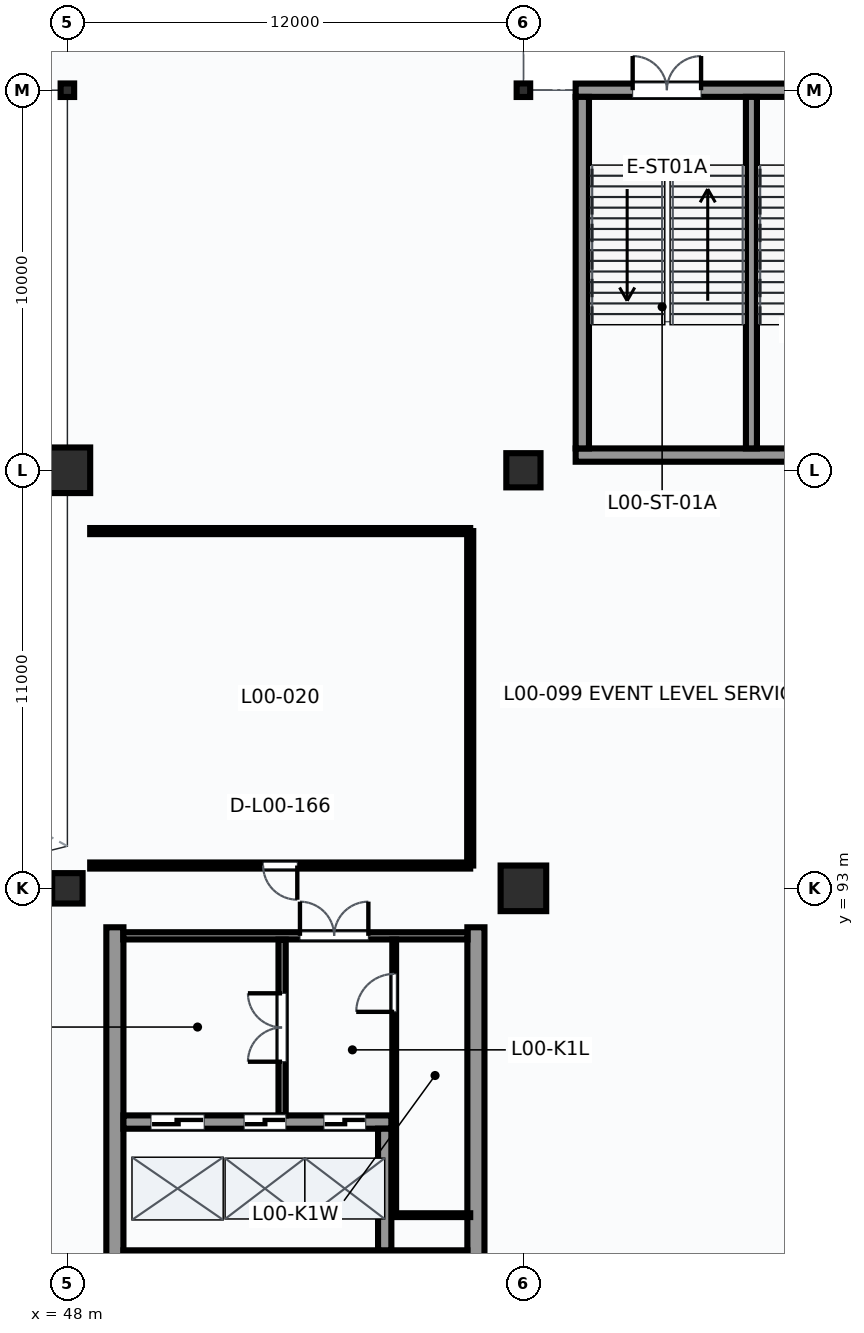
"""IFC4 building model, lengths in metres.
Left out: names, types, materials, properties, quantities, classifications, styles, units other than length and angle.
Written with IfcOpenShell. Run it as: python <this file> out.ifc"""

import sys

from ifc_helpers import new_model, si_unit, direction, frame, frame_2d, origin, origin_2d, place, context, subcontext, project, spatial, rectangle, circle, hollow_circle, extrude, element, fill, save


model = new_model("IFC4")
c1 = context("Model", 3, precision=1e-05, world=origin(), true_north=direction((0.0, 1.0)))
c2 = subcontext(c1, "Body", "Model", "MODEL_VIEW")
j1 = project(units=[si_unit("LENGTHUNIT", "METRE"), si_unit("PLANEANGLEUNIT", "RADIAN")], contexts=[c1])
p1 = place(None, origin())
s1 = spatial("IfcSite", under=j1, at=p1, CompositionType="ELEMENT")
p2 = place(p1, origin())
s2 = spatial("IfcBuilding", under=s1, at=p2, CompositionType="ELEMENT")
p3 = place(p2, origin())
s3 = spatial("IfcBuildingStorey", under=s2, at=p3, CompositionType="ELEMENT", Elevation=0.0)
p4 = place(p3, frame((48.0, 93.0, 0.0), z_axis=(0.0, 0.0, 1.0), x_axis=(1.0, 0.0, 0.0)))
e1 = element("IfcColumn", 1, at=p4, inside=s3, PredefinedType="COLUMN", context=c2, shape_type="SweptSolid", body=[
    extrude(rectangle(XDim=0.8, YDim=0.8, at=origin_2d()), origin(), (0.0, 0.0, 1.0), 5.4),
])
p5 = place(p3, frame((48.0, 104.0, 0.0), z_axis=(0.0, 0.0, 1.0), x_axis=(1.0, 0.0, 0.0)))
e2 = element("IfcColumn", 2, at=p5, inside=s3, PredefinedType="COLUMN", context=c2, shape_type="SweptSolid", body=[
    extrude(rectangle(XDim=1.2, YDim=1.2, at=origin_2d()), origin(), (0.0, 0.0, 1.0), 5.4),
])
p6 = place(p3, frame((48.0, 114.0, 0.0), z_axis=(0.0, 0.0, 1.0), x_axis=(1.0, 0.0, 0.0)))
e3 = element("IfcColumn", 3, at=p6, inside=s3, PredefinedType="PILASTER", context=c2, shape_type="SweptSolid", body=[
    extrude(hollow_circle(Radius=0.178, WallThickness=0.014, at=origin_2d()), origin(), (0.0, 0.0, 1.0), 5.4),
])
p7 = place(p3, frame((60.0, 93.0, 0.0), z_axis=(0.0, 0.0, 1.0), x_axis=(1.0, 0.0, 0.0)))
e4 = element("IfcColumn", 4, at=p7, inside=s3, PredefinedType="COLUMN", context=c2, shape_type="SweptSolid", body=[
    extrude(rectangle(XDim=1.2, YDim=1.2, at=origin_2d()), origin(), (0.0, 0.0, 1.0), 5.4),
])
p8 = place(p3, frame((60.0, 104.0, 0.0), z_axis=(0.0, 0.0, 1.0), x_axis=(1.0, 0.0, 0.0)))
e5 = element("IfcColumn", 5, at=p8, inside=s3, PredefinedType="COLUMN", context=c2, shape_type="SweptSolid", body=[
    extrude(circle(Radius=0.45, at=origin_2d()), origin(), (0.0, 0.0, 1.0), 5.4),
])
p9 = place(p3, frame((60.0, 114.0, 0.0), z_axis=(0.0, 0.0, 1.0), x_axis=(1.0, 0.0, 0.0)))
e6 = element("IfcColumn", 6, at=p9, inside=s3, PredefinedType="PILASTER", context=c2, shape_type="SweptSolid", body=[
    extrude(hollow_circle(Radius=0.178, WallThickness=0.014, at=origin_2d()), origin(), (0.0, 0.0, 1.0), 5.4),
])
p10 = place(p3, frame((61.375, 104.4, 0.0), z_axis=(0.0, 0.0, 1.0), x_axis=(1.0, 0.0, 0.0)))
e7 = element("IfcWall", 7, at=p10, inside=s3, PredefinedType="SHEAR", context=c2, shape_type="SweptSolid", body=[
    extrude(rectangle(XDim=9.25, YDim=0.35, at=frame_2d((4.625, 0.0))), origin(), (0.0, 0.0, 1.0), 5.4),
])
p11 = place(p3, frame((61.375, 114.0, 0.0), z_axis=(0.0, 0.0, 1.0), x_axis=(1.0, 0.0, 0.0)))
e8 = element("IfcWall", 8, at=p11, inside=s3, PredefinedType="SHEAR", context=c2, shape_type="SweptSolid", body=[
    extrude(rectangle(XDim=9.25, YDim=0.35, at=frame_2d((4.625, 0.0))), origin(), (0.0, 0.0, 1.0), 4.496),
])
p12 = place(p11, frame((1.5, 0.0, 0.0)))
e9 = element("IfcOpeningElement", 9, at=p12, cuts=e8, PredefinedType="OPENING", context=c2, shape_type="SweptSolid", body=[
    extrude(rectangle(XDim=1.8, YDim=2.2, at=frame_2d((0.9, 1.1))), frame((0.0, 0.185, 0.0), z_axis=(0.0, -1.0, 0.0), x_axis=(1.0, 0.0, 0.0)), (0.0, 0.0, 1.0), 0.37),
])
p13 = place(p11, frame((6.05, 0.0, 0.0)))
e10 = element("IfcOpeningElement", 10, at=p13, cuts=e8, PredefinedType="OPENING", context=c2, shape_type="SweptSolid", body=[
    extrude(rectangle(XDim=1.6, YDim=2.2, at=frame_2d((0.8, 1.1))), frame((0.0, 0.185, 0.0), z_axis=(0.0, -1.0, 0.0), x_axis=(1.0, 0.0, 0.0)), (0.0, 0.0, 1.0), 0.37),
])
p14 = place(p3, frame((61.55, 104.575, 0.0), z_axis=(0.0, 0.0, 1.0), x_axis=(0.0, 1.0, 0.0)))
e11 = element("IfcWall", 11, at=p14, inside=s3, PredefinedType="SHEAR", context=c2, shape_type="SweptSolid", body=[
    extrude(rectangle(XDim=9.25, YDim=0.35, at=frame_2d((4.625, 0.0))), origin(), (0.0, 0.0, 1.0), 5.4),
])
p15 = place(p3, frame((66.0, 104.575, 0.0), z_axis=(0.0, 0.0, 1.0), x_axis=(0.0, 1.0, 0.0)))
e12 = element("IfcWall", 12, at=p15, inside=s3, PredefinedType="SHEAR", context=c2, shape_type="SweptSolid", body=[
    extrude(rectangle(XDim=9.25, YDim=0.29, at=frame_2d((4.625, 0.0))), origin(), (0.0, 0.0, 1.0), 5.4),
])
for number, where, z_axis, x_axis in (
    (13, (49.25, 83.025, 0.0), (0.0, 0.0, 1.0), (0.0, 1.0, 0.0)),
    (14, (58.75, 83.025, 0.0), (0.0, 0.0, 1.0), (0.0, 1.0, 0.0)),
):
    element("IfcWall", number, at=place(p3, frame(where, z_axis=z_axis, x_axis=x_axis)), inside=s3, PredefinedType="SHEAR", context=c2, shape_type="SweptSolid", body=[
        extrude(rectangle(XDim=8.95, YDim=0.45, at=frame_2d((4.475, 0.0))), origin(), (0.0, 0.0, 1.0), 5.4),
    ])
p16 = place(p3, frame((49.475, 83.25, 0.0), z_axis=(0.0, 0.0, 1.0), x_axis=(1.0, 0.0, 0.0)))
e15 = element("IfcWall", 15, at=p16, inside=s3, PredefinedType="SHEAR", context=c2, shape_type="SweptSolid", body=[
    extrude(rectangle(XDim=9.05, YDim=0.45, at=frame_2d((4.525, 0.0))), origin(), (0.0, 0.0, 1.0), 5.4),
])
p17 = place(p3, frame((49.475, 86.85, 0.0), z_axis=(0.0, 0.0, 1.0), x_axis=(1.0, 0.0, 0.0)))
e16 = element("IfcWall", 16, at=p17, inside=s3, PredefinedType="SHEAR", context=c2, shape_type="SweptSolid", body=[
    extrude(rectangle(XDim=7.05, YDim=0.35, at=frame_2d((3.525, 0.0))), origin(), (0.0, 0.0, 1.0), 5.4),
])
p18 = place(p17, frame((0.725, 0.0, 0.0)))
e17 = element("IfcOpeningElement", 17, at=p18, cuts=e16, PredefinedType="OPENING", context=c2, shape_type="SweptSolid", body=[
    extrude(rectangle(XDim=1.4, YDim=2.3, at=frame_2d((0.7, 1.15))), frame((0.0, 0.185, 0.0), z_axis=(0.0, -1.0, 0.0), x_axis=(1.0, 0.0, 0.0)), (0.0, 0.0, 1.0), 0.37),
])
p19 = place(p17, frame((3.175, 0.0, 0.0)))
e18 = element("IfcOpeningElement", 18, at=p19, cuts=e16, PredefinedType="OPENING", context=c2, shape_type="SweptSolid", body=[
    extrude(rectangle(XDim=1.1, YDim=2.2, at=frame_2d((0.55, 1.1))), frame((0.0, 0.185, 0.0), z_axis=(0.0, -1.0, 0.0), x_axis=(1.0, 0.0, 0.0)), (0.0, 0.0, 1.0), 0.37),
])
p20 = place(p17, frame((5.275, 0.0, 0.0)))
e19 = element("IfcOpeningElement", 19, at=p20, cuts=e16, PredefinedType="OPENING", context=c2, shape_type="SweptSolid", body=[
    extrude(rectangle(XDim=1.1, YDim=2.2, at=frame_2d((0.55, 1.1))), frame((0.0, 0.185, 0.0), z_axis=(0.0, -1.0, 0.0), x_axis=(1.0, 0.0, 0.0)), (0.0, 0.0, 1.0), 0.37),
])
p21 = place(p3, frame((56.35, 83.475, 0.0), z_axis=(0.0, 0.0, 1.0), x_axis=(0.0, 1.0, 0.0)))
e20 = element("IfcWall", 20, at=p21, inside=s3, PredefinedType="SHEAR", context=c2, shape_type="SweptSolid", body=[
    extrude(rectangle(XDim=3.2, YDim=0.35, at=frame_2d((1.6, 0.0))), origin(), (0.0, 0.0, 1.0), 5.4),
])
p22 = place(p3, frame((49.47, 91.75, 0.0), z_axis=(0.0, 0.0, 1.0), x_axis=(1.0, 0.0, 0.0)))
e21 = element("IfcWall", 21, at=p22, inside=s3, PredefinedType="PARTITIONING", context=c2, shape_type="SweptSolid", body=[
    extrude(rectangle(XDim=9.06, YDim=0.19, at=frame_2d((4.53, 0.0))), origin(), (0.0, 0.0, 1.0), 5.06),
])
p23 = place(p22, frame((4.65, 0.0, 0.0)))
e22 = element("IfcOpeningElement", 22, at=p23, cuts=e21, PredefinedType="OPENING", context=c2, shape_type="SweptSolid", body=[
    extrude(rectangle(XDim=1.8, YDim=2.3, at=frame_2d((0.9, 1.15))), frame((0.0, 0.105, 0.0), z_axis=(0.0, -1.0, 0.0), x_axis=(1.0, 0.0, 0.0)), (0.0, 0.0, 1.0), 0.21),
])
p24 = place(p3, frame((53.65, 87.025, 0.0), z_axis=(0.0, 0.0, 1.0), x_axis=(0.0, 1.0, 0.0)))
e23 = element("IfcWall", 23, at=p24, inside=s3, PredefinedType="PARTITIONING", context=c2, shape_type="SweptSolid", body=[
    extrude(rectangle(XDim=4.625, YDim=0.19, at=frame_2d((2.312, 0.0))), origin(), (0.0, 0.0, 1.0), 5.06),
])
p25 = place(p24, frame((1.413, 0.0, 0.0)))
e24 = element("IfcOpeningElement", 24, at=p25, cuts=e23, PredefinedType="OPENING", context=c2, shape_type="SweptSolid", body=[
    extrude(rectangle(XDim=1.8, YDim=2.2, at=frame_2d((0.9, 1.1))), frame((0.0, 0.105, 0.0), z_axis=(0.0, -1.0, 0.0), x_axis=(1.0, 0.0, 0.0)), (0.0, 0.0, 1.0), 0.21),
])
p26 = place(p3, frame((56.6, 84.4, 0.0), z_axis=(0.0, 0.0, 1.0), x_axis=(0.0, 1.0, 0.0)))
e25 = element("IfcWall", 25, at=p26, inside=s3, PredefinedType="PARTITIONING", context=c2, shape_type="SweptSolid", body=[
    extrude(rectangle(XDim=7.25, YDim=0.1, at=frame_2d((3.625, 0.0))), origin(), (0.0, 0.0, 1.0), 5.06),
])
p27 = place(p26, frame((5.35, 0.0, 0.0)))
e26 = element("IfcOpeningElement", 26, at=p27, cuts=e25, PredefinedType="OPENING", context=c2, shape_type="SweptSolid", body=[
    extrude(rectangle(XDim=1.0, YDim=2.1, at=frame_2d((0.5, 1.05))), frame((0.0, 0.06, 0.0), z_axis=(0.0, -1.0, 0.0), x_axis=(1.0, 0.0, 0.0)), (0.0, 0.0, 1.0), 0.12),
])
p28 = place(p3, frame((56.6, 84.4, 0.0), z_axis=(0.0, 0.0, 1.0), x_axis=(1.0, 0.0, 0.0)))
e27 = element("IfcWall", 27, at=p28, inside=s3, PredefinedType="PARTITIONING", context=c2, shape_type="SweptSolid", body=[
    extrude(rectangle(XDim=2.0, YDim=0.1, at=frame_2d((1.0, 0.0))), origin(), (0.0, 0.0, 1.0), 5.06),
])
p29 = place(p3, frame((58.6, 102.4, 0.0), z_axis=(0.0, 0.0, 1.0), x_axis=(0.0, -1.0, 0.0)))
e28 = element("IfcWall", 28, at=p29, inside=s3, PredefinedType="PARTITIONING", context=c2, shape_type="SweptSolid", body=[
    extrude(rectangle(XDim=8.8, YDim=0.16, at=frame_2d((4.4, 0.0))), origin(), (0.0, 0.0, 1.0), 4.58),
])
p30 = place(p3, frame((58.6, 93.6, 0.0), z_axis=(0.0, 0.0, 1.0), x_axis=(-1.0, 0.0, 0.0)))
e29 = element("IfcWall", 29, at=p30, inside=s3, PredefinedType="PARTITIONING", context=c2, shape_type="SweptSolid", body=[
    extrude(rectangle(XDim=10.0, YDim=0.16, at=frame_2d((5.0, 0.0))), origin(), (0.0, 0.0, 1.0), 5.06),
])
p31 = place(p30, frame((4.55, 0.0, 0.0)))
e30 = element("IfcOpeningElement", 30, at=p31, cuts=e29, PredefinedType="OPENING", context=c2, shape_type="SweptSolid", body=[
    extrude(rectangle(XDim=0.9, YDim=2.1, at=frame_2d((0.45, 1.05))), frame((0.0, 0.09, 0.0), z_axis=(0.0, -1.0, 0.0), x_axis=(1.0, 0.0, 0.0)), (0.0, 0.0, 1.0), 0.18),
])
p32 = place(p3, frame((48.6, 102.4, 0.0), z_axis=(0.0, 0.0, 1.0), x_axis=(1.0, 0.0, 0.0)))
e31 = element("IfcWall", 31, at=p32, inside=s3, PredefinedType="PARTITIONING", context=c2, shape_type="SweptSolid", body=[
    extrude(rectangle(XDim=10.0, YDim=0.16, at=frame_2d((5.0, 0.0))), origin(), (0.0, 0.0, 1.0), 5.06),
])
p33 = place(p12, origin())
e32 = element("IfcDoor", 32, at=p33, inside=s3, OperationType="DOUBLE_DOOR_SINGLE_SWING", PredefinedType="DOOR", context=c2, shape_type="SweptSolid", body=[
    extrude(rectangle(XDim=1.8, YDim=2.2, at=frame_2d((0.9, 1.1))), frame((0.0, 0.025, 0.0), z_axis=(0.0, -1.0, 0.0), x_axis=(1.0, 0.0, 0.0)), (0.0, 0.0, 1.0), 0.05),
])
fill(e9, e32)
p34 = place(p18, origin())
e33 = element("IfcDoor", 33, at=p34, inside=s3, OperationType="SLIDING_TO_LEFT", PredefinedType="DOOR", context=c2, shape_type="SweptSolid", body=[
    extrude(rectangle(XDim=1.4, YDim=2.3, at=frame_2d((0.7, 1.15))), frame((0.0, 0.025, 0.0), z_axis=(0.0, -1.0, 0.0), x_axis=(1.0, 0.0, 0.0)), (0.0, 0.0, 1.0), 0.05),
])
fill(e17, e33)
p35 = place(p19, origin())
e34 = element("IfcDoor", 34, at=p35, inside=s3, OperationType="SLIDING_TO_LEFT", PredefinedType="DOOR", context=c2, shape_type="SweptSolid", body=[
    extrude(rectangle(XDim=1.1, YDim=2.2, at=frame_2d((0.55, 1.1))), frame((0.0, 0.025, 0.0), z_axis=(0.0, -1.0, 0.0), x_axis=(1.0, 0.0, 0.0)), (0.0, 0.0, 1.0), 0.05),
])
fill(e18, e34)
p36 = place(p20, origin())
e35 = element("IfcDoor", 35, at=p36, inside=s3, OperationType="SLIDING_TO_LEFT", PredefinedType="DOOR", context=c2, shape_type="SweptSolid", body=[
    extrude(rectangle(XDim=1.1, YDim=2.2, at=frame_2d((0.55, 1.1))), frame((0.0, 0.025, 0.0), z_axis=(0.0, -1.0, 0.0), x_axis=(1.0, 0.0, 0.0)), (0.0, 0.0, 1.0), 0.05),
])
fill(e19, e35)
p37 = place(p23, origin())
e36 = element("IfcDoor", 36, at=p37, inside=s3, OperationType="DOUBLE_DOOR_SINGLE_SWING", PredefinedType="DOOR", context=c2, shape_type="SweptSolid", body=[
    extrude(rectangle(XDim=1.8, YDim=2.3, at=frame_2d((0.9, 1.15))), frame((0.0, 0.025, 0.0), z_axis=(0.0, -1.0, 0.0), x_axis=(1.0, 0.0, 0.0)), (0.0, 0.0, 1.0), 0.05),
])
fill(e22, e36)
p38 = place(p25, origin())
e37 = element("IfcDoor", 37, at=p38, inside=s3, OperationType="DOUBLE_DOOR_SINGLE_SWING", PredefinedType="DOOR", context=c2, shape_type="SweptSolid", body=[
    extrude(rectangle(XDim=1.8, YDim=2.2, at=frame_2d((0.9, 1.1))), frame((0.0, 0.025, 0.0), z_axis=(0.0, -1.0, 0.0), x_axis=(1.0, 0.0, 0.0)), (0.0, 0.0, 1.0), 0.05),
])
fill(e24, e37)
p39 = place(p27, origin())
e38 = element("IfcDoor", 38, at=p39, inside=s3, OperationType="SINGLE_SWING_LEFT", PredefinedType="DOOR", context=c2, shape_type="SweptSolid", body=[
    extrude(rectangle(XDim=1.0, YDim=2.1, at=frame_2d((0.5, 1.05))), frame((0.0, 0.025, 0.0), z_axis=(0.0, -1.0, 0.0), x_axis=(1.0, 0.0, 0.0)), (0.0, 0.0, 1.0), 0.05),
])
fill(e26, e38)
p40 = place(p31, origin())
e39 = element("IfcDoor", 39, at=p40, inside=s3, OperationType="SINGLE_SWING_LEFT", PredefinedType="DOOR", context=c2, shape_type="SweptSolid", body=[
    extrude(rectangle(XDim=0.9, YDim=2.1, at=frame_2d((0.45, 1.05))), frame((0.0, 0.025, 0.0), z_axis=(0.0, -1.0, 0.0), x_axis=(1.0, 0.0, 0.0)), (0.0, 0.0, 1.0), 0.05),
])
fill(e30, e39)
save(model, sys.argv[1])
